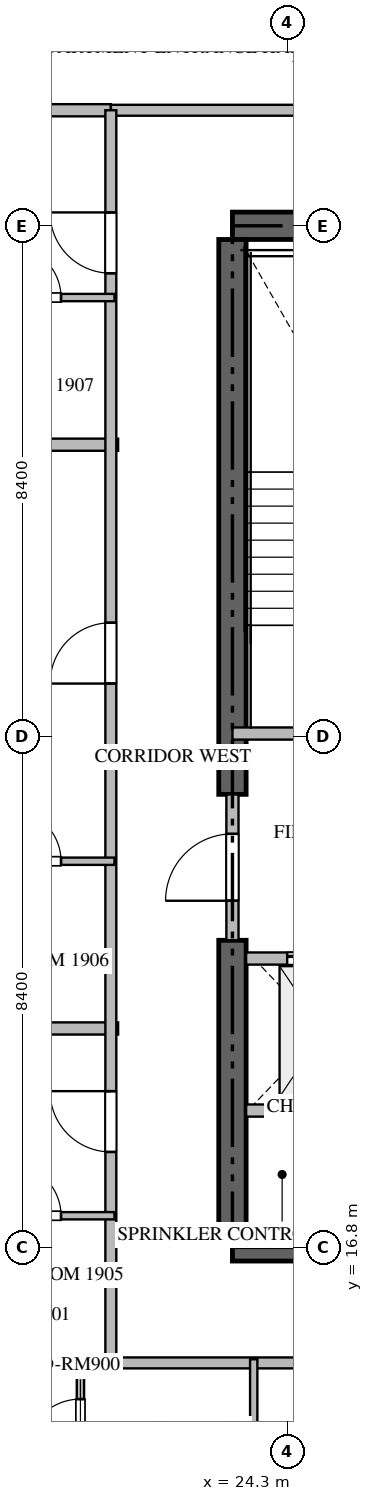
"""IFC4 building model, lengths in metres.
Left out: names, types, materials, properties, quantities, classifications, styles, units other than length and angle.
Written with IfcOpenShell. Run it as: python <this file> out.ifc"""

import sys

from ifc_helpers import new_model, si_unit, direction, frame, frame_2d, origin, place, context, subcontext, project, spatial, rectangle, extrude, source, transform, mapped, element, fill, save


model = new_model("IFC4")
c1 = context("Model", 3, precision=1e-05, world=origin(), true_north=direction((0.0, 1.0)))
c2 = subcontext(c1, "Body", "Model", "MODEL_VIEW")
j1 = project(units=[si_unit("LENGTHUNIT", "METRE"), si_unit("PLANEANGLEUNIT", "RADIAN")], contexts=[c1])
p1 = place(None, origin())
s1 = spatial("IfcSite", under=j1, at=p1, CompositionType="ELEMENT")
p2 = place(p1, origin())
s2 = spatial("IfcBuilding", under=s1, at=p2, CompositionType="ELEMENT")
p3 = place(p2, frame((0.0, 0.0, 79.2)))
s3 = spatial("IfcBuildingStorey", under=s2, at=p3, CompositionType="ELEMENT", Elevation=79.2)
for number, where, z_axis, x_axis in (
    (1, (23.4, 16.8, -0.26), (0.0, 0.0, 1.0), (1.0, 0.0, 0.0)),
    (2, (41.4, 33.6, -0.26), (0.0, 0.0, 1.0), (-1.0, 0.0, 0.0)),
):
    element("IfcWall", number, at=place(p3, frame(where, z_axis=z_axis, x_axis=x_axis)), inside=s3, PredefinedType="SHEAR", context=c2, shape_type="SweptSolid", body=[
        extrude(rectangle(XDim=18.0, YDim=0.45, at=frame_2d((9.0, 0.0))), origin(), (0.0, 0.0, 1.0), 3.748),
    ])
p4 = place(p3, frame((23.4, 17.025, -0.26), z_axis=(0.0, 0.0, 1.0), x_axis=(0.0, 1.0, 0.0)))
e3 = element("IfcWall", 3, at=p4, inside=s3, PredefinedType="SHEAR", context=c2, shape_type="SweptSolid", body=[
    extrude(rectangle(XDim=4.825, YDim=0.45, at=frame_2d((2.413, 0.0))), origin(), (0.0, 0.0, 1.0), 3.748),
])
p5 = place(p3, frame((23.4, 24.25, -0.26), z_axis=(0.0, 0.0, 1.0), x_axis=(0.0, 1.0, 0.0)))
e4 = element("IfcWall", 4, at=p5, inside=s3, PredefinedType="SHEAR", context=c2, shape_type="SweptSolid", body=[
    extrude(rectangle(XDim=9.125, YDim=0.45, at=frame_2d((4.562, 0.0))), origin(), (0.0, 0.0, 1.0), 3.748),
])
p6 = place(p3, frame((23.4, 25.25, 0.0), z_axis=(0.0, 0.0, 1.0), x_axis=(1.0, 0.0, 0.0)))
e5 = element("IfcWall", 5, at=p6, inside=s3, PredefinedType="STANDARD", context=c2, shape_type="SweptSolid", body=[
    extrude(rectangle(XDim=4.45, YDim=0.2, at=frame_2d((2.225, 0.0))), origin(), (0.0, 0.0, 1.0), 3.49),
])
p7 = place(p6, frame((1.65, 0.0, 0.0)))
e6 = element("IfcOpeningElement", 6, at=p7, cuts=e5, PredefinedType="OPENING", context=c2, shape_type="SweptSolid", body=[
    extrude(rectangle(XDim=1.1, YDim=2.15, at=frame_2d((0.55, 1.075))), frame((0.0, 0.11, 0.0), z_axis=(0.0, -1.0, 0.0), x_axis=(1.0, 0.0, 0.0)), (0.0, 0.0, 1.0), 0.22),
])
p8 = place(p3, frame((23.625, 21.55, 0.0), z_axis=(0.0, 0.0, 1.0), x_axis=(1.0, 0.0, 0.0)))
e7 = element("IfcWall", 7, at=p8, inside=s3, PredefinedType="STANDARD", context=c2, shape_type="SweptSolid", body=[
    extrude(rectangle(XDim=2.425, YDim=0.2, at=frame_2d((1.212, 0.0))), origin(), (0.0, 0.0, 1.0), 3.49),
])
p9 = place(p8, frame((0.675, 0.0, 0.0)))
e8 = element("IfcOpeningElement", 8, at=p9, cuts=e7, PredefinedType="OPENING", context=c2, shape_type="SweptSolid", body=[
    extrude(rectangle(XDim=1.2, YDim=2.2, at=frame_2d((0.6, 1.1))), frame((0.0, 0.11, 0.0), z_axis=(0.0, -1.0, 0.0), x_axis=(1.0, 0.0, 0.0)), (0.0, 0.0, 1.0), 0.22),
])
p10 = place(p3, frame((23.625, 19.05, 0.0), z_axis=(0.0, 0.0, 1.0), x_axis=(1.0, 0.0, 0.0)))
e9 = element("IfcWall", 9, at=p10, inside=s3, PredefinedType="STANDARD", context=c2, shape_type="SweptSolid", body=[
    extrude(rectangle(XDim=2.425, YDim=0.2, at=frame_2d((1.212, 0.0))), origin(), (0.0, 0.0, 1.0), 3.49),
])
p11 = place(p3, frame((23.4, 21.852, 0.0), z_axis=(0.0, 0.0, 1.0), x_axis=(0.0, 1.0, 0.0)))
e10 = element("IfcWall", 10, at=p11, inside=s3, PredefinedType="STANDARD", context=c2, shape_type="SweptSolid", body=[
    extrude(rectangle(XDim=2.396, YDim=0.2, at=frame_2d((1.198, 0.0))), origin(), (0.0, 0.0, 1.0), 3.49),
])
p12 = place(p11, frame((0.648, 0.0, 0.0)))
e11 = element("IfcOpeningElement", 11, at=p12, cuts=e10, PredefinedType="OPENING", context=c2, shape_type="SweptSolid", body=[
    extrude(rectangle(XDim=1.1, YDim=2.15, at=frame_2d((0.55, 1.075))), frame((0.0, 0.11, 0.0), z_axis=(0.0, -1.0, 0.0), x_axis=(1.0, 0.0, 0.0)), (0.0, 0.0, 1.0), 0.22),
])
for number, where, z_axis, x_axis in (
    (12, (6.082, 20.4, 0.0), (0.0, 0.0, 1.0), (1.0, 0.0, 0.0)),
    (13, (6.082, 30.0, 0.0), (0.0, 0.0, 1.0), (1.0, 0.0, 0.0)),
):
    element("IfcWall", number, at=place(p3, frame(where, z_axis=z_axis, x_axis=x_axis)), inside=s3, PredefinedType="PARTITIONING", context=c2, shape_type="SweptSolid", body=[
        extrude(rectangle(XDim=15.438, YDim=0.2, at=frame_2d((7.719, 0.0))), origin(), (0.0, 0.0, 1.0), 3.49),
    ])
for number, where, z_axis, x_axis in (
    (14, (6.082, 14.9, 0.0), (0.0, 0.0, 1.0), (1.0, 0.0, 0.0)),
    (15, (6.082, 35.5, 0.0), (0.0, 0.0, 1.0), (1.0, 0.0, 0.0)),
):
    element("IfcWall", number, at=place(p3, frame(where, z_axis=z_axis, x_axis=x_axis)), inside=s3, PredefinedType="PARTITIONING", context=c2, shape_type="SweptSolid", body=[
        extrude(rectangle(XDim=15.318, YDim=0.2, at=frame_2d((7.659, 0.0))), origin(), (0.0, 0.0, 1.0), 3.49),
    ])
p13 = place(p3, frame((21.402, 14.9, 0.0), z_axis=(0.0, 0.0, 1.0), x_axis=(1.0, 0.0, 0.0)))
e16 = element("IfcWall", 16, at=p13, inside=s3, PredefinedType="PARTITIONING", context=c2, shape_type="SweptSolid", body=[
    extrude(rectangle(XDim=21.996, YDim=0.18, at=frame_2d((10.998, 0.0))), origin(), (0.0, 0.0, 1.0), 3.49),
])
p14 = place(p13, frame((4.724, 0.0, 0.0)))
e17 = element("IfcOpeningElement", 17, at=p14, cuts=e16, PredefinedType="OPENING", context=c2, shape_type="SweptSolid", body=[
    extrude(rectangle(XDim=1.0, YDim=2.15, at=frame_2d((0.5, 1.075))), frame((0.0, 0.1, 0.0), z_axis=(0.0, -1.0, 0.0), x_axis=(1.0, 0.0, 0.0)), (0.0, 0.0, 1.0), 0.2),
])
p15 = place(p13, frame((10.498, 0.0, 0.0)))
e18 = element("IfcOpeningElement", 18, at=p15, cuts=e16, PredefinedType="OPENING", context=c2, shape_type="SweptSolid", body=[
    extrude(rectangle(XDim=1.0, YDim=2.15, at=frame_2d((0.5, 1.075))), frame((0.0, 0.1, 0.0), z_axis=(0.0, -1.0, 0.0), x_axis=(1.0, 0.0, 0.0)), (0.0, 0.0, 1.0), 0.2),
])
p16 = place(p3, frame((21.402, 35.5, 0.0), z_axis=(0.0, 0.0, 1.0), x_axis=(1.0, 0.0, 0.0)))
e19 = element("IfcWall", 19, at=p16, inside=s3, PredefinedType="PARTITIONING", context=c2, shape_type="SweptSolid", body=[
    extrude(rectangle(XDim=21.996, YDim=0.18, at=frame_2d((10.998, 0.0))), origin(), (0.0, 0.0, 1.0), 3.49),
])
p17 = place(p16, frame((10.498, 0.0, 0.0)))
e20 = element("IfcOpeningElement", 20, at=p17, cuts=e19, PredefinedType="OPENING", context=c2, shape_type="SweptSolid", body=[
    extrude(rectangle(XDim=1.0, YDim=2.15, at=frame_2d((0.5, 1.075))), frame((0.0, 0.1, 0.0), z_axis=(0.0, -1.0, 0.0), x_axis=(1.0, 0.0, 0.0)), (0.0, 0.0, 1.0), 0.2),
])
p18 = place(p16, frame((16.272, 0.0, 0.0)))
e21 = element("IfcOpeningElement", 21, at=p18, cuts=e19, PredefinedType="OPENING", context=c2, shape_type="SweptSolid", body=[
    extrude(rectangle(XDim=1.0, YDim=2.15, at=frame_2d((0.5, 1.075))), frame((0.0, 0.1, 0.0), z_axis=(0.0, -1.0, 0.0), x_axis=(1.0, 0.0, 0.0)), (0.0, 0.0, 1.0), 0.2),
])
p19 = place(p3, frame((21.4, 14.9, 0.0), z_axis=(0.0, 0.0, 1.0), x_axis=(0.0, 1.0, 0.0)))
e22 = element("IfcWall", 22, at=p19, inside=s3, PredefinedType="PARTITIONING", context=c2, shape_type="SweptSolid", body=[
    extrude(rectangle(XDim=20.6, YDim=0.18, at=frame_2d((10.3, 0.0))), origin(), (0.0, 0.0, 1.0), 3.49),
])
p20 = place(p19, frame((3.469, 0.0, 0.0)))
e23 = element("IfcOpeningElement", 23, at=p20, cuts=e22, PredefinedType="OPENING", context=c2, shape_type="SweptSolid", body=[
    extrude(rectangle(XDim=1.0, YDim=2.15, at=frame_2d((0.5, 1.075))), frame((0.0, 0.1, 0.0), z_axis=(0.0, -1.0, 0.0), x_axis=(1.0, 0.0, 0.0)), (0.0, 0.0, 1.0), 0.2),
])
p21 = place(p19, frame((11.172, 0.0, 0.0)))
e24 = element("IfcOpeningElement", 24, at=p21, cuts=e22, PredefinedType="OPENING", context=c2, shape_type="SweptSolid", body=[
    extrude(rectangle(XDim=1.0, YDim=2.15, at=frame_2d((0.5, 1.075))), frame((0.0, 0.1, 0.0), z_axis=(0.0, -1.0, 0.0), x_axis=(1.0, 0.0, 0.0)), (0.0, 0.0, 1.0), 0.2),
])
p22 = place(p19, frame((17.92, 0.0, 0.0)))
e25 = element("IfcOpeningElement", 25, at=p22, cuts=e22, PredefinedType="OPENING", context=c2, shape_type="SweptSolid", body=[
    extrude(rectangle(XDim=1.0, YDim=2.15, at=frame_2d((0.5, 1.075))), frame((0.0, 0.1, 0.0), z_axis=(0.0, -1.0, 0.0), x_axis=(1.0, 0.0, 0.0)), (0.0, 0.0, 1.0), 0.2),
])
p23 = place(p3, frame((23.75, 12.15, 0.0), z_axis=(0.0, 0.0, 1.0), x_axis=(0.0, 1.0, 0.0)))
e26 = element("IfcWall", 26, at=p23, inside=s3, PredefinedType="PARTITIONING", context=c2, shape_type="SweptSolid", body=[
    extrude(rectangle(XDim=2.81, YDim=0.12, at=frame_2d((1.405, 0.0))), origin(), (0.0, 0.0, 1.0), 3.49),
])
p24 = place(p3, frame((20.9, 12.75, 0.0), z_axis=(0.0, 0.0, 1.0), x_axis=(0.0, 1.0, 0.0)))
e27 = element("IfcWall", 27, at=p24, inside=s3, PredefinedType="PARTITIONING", context=c2, shape_type="SweptSolid", body=[
    extrude(rectangle(XDim=2.21, YDim=0.12, at=frame_2d((1.105, 0.0))), origin(), (0.0, 0.0, 1.0), 3.49),
])
p25 = place(p24, frame((0.655, 0.0, 0.0)))
e28 = element("IfcOpeningElement", 28, at=p25, cuts=e27, PredefinedType="OPENING", context=c2, shape_type="SweptSolid", body=[
    extrude(rectangle(XDim=0.9, YDim=2.1, at=frame_2d((0.45, 1.05))), frame((0.0, 0.07, 0.0), z_axis=(0.0, -1.0, 0.0), x_axis=(1.0, 0.0, 0.0)), (0.0, 0.0, 1.0), 0.14),
])
p26 = place(p3, frame((18.852, 17.32, 0.0), z_axis=(0.0, 0.0, 1.0), x_axis=(1.0, 0.0, 0.0)))
e29 = element("IfcWall", 29, at=p26, inside=s3, PredefinedType="PARTITIONING", context=c2, shape_type="SweptSolid", body=[
    extrude(rectangle(XDim=2.608, YDim=0.12, at=frame_2d((1.304, 0.0))), origin(), (0.0, 0.0, 1.0), 3.49),
])
p27 = place(p26, frame((0.879, 0.0, 0.0)))
e30 = element("IfcOpeningElement", 30, at=p27, cuts=e29, PredefinedType="OPENING", context=c2, shape_type="SweptSolid", body=[
    extrude(rectangle(XDim=0.85, YDim=2.1, at=frame_2d((0.425, 1.05))), frame((0.0, 0.07, 0.0), z_axis=(0.0, -1.0, 0.0), x_axis=(1.0, 0.0, 0.0)), (0.0, 0.0, 1.0), 0.14),
])
p28 = place(p3, frame((18.852, 23.15, 0.0), z_axis=(0.0, 0.0, 1.0), x_axis=(1.0, 0.0, 0.0)))
e31 = element("IfcWall", 31, at=p28, inside=s3, PredefinedType="PARTITIONING", context=c2, shape_type="SweptSolid", body=[
    extrude(rectangle(XDim=2.608, YDim=0.12, at=frame_2d((1.304, 0.0))), origin(), (0.0, 0.0, 1.0), 3.49),
])
p29 = place(p28, frame((0.879, 0.0, 0.0)))
e32 = element("IfcOpeningElement", 32, at=p29, cuts=e31, PredefinedType="OPENING", context=c2, shape_type="SweptSolid", body=[
    extrude(rectangle(XDim=0.85, YDim=2.1, at=frame_2d((0.425, 1.05))), frame((0.0, 0.07, 0.0), z_axis=(0.0, -1.0, 0.0), x_axis=(1.0, 0.0, 0.0)), (0.0, 0.0, 1.0), 0.14),
])
p30 = place(p3, frame((18.852, 32.42, 0.0), z_axis=(0.0, 0.0, 1.0), x_axis=(1.0, 0.0, 0.0)))
e33 = element("IfcWall", 33, at=p30, inside=s3, PredefinedType="PARTITIONING", context=c2, shape_type="SweptSolid", body=[
    extrude(rectangle(XDim=2.608, YDim=0.12, at=frame_2d((1.304, 0.0))), origin(), (0.0, 0.0, 1.0), 3.49),
])
p31 = place(p30, frame((0.879, 0.0, 0.0)))
e34 = element("IfcOpeningElement", 34, at=p31, cuts=e33, PredefinedType="OPENING", context=c2, shape_type="SweptSolid", body=[
    extrude(rectangle(XDim=0.85, YDim=2.1, at=frame_2d((0.425, 1.05))), frame((0.0, 0.07, 0.0), z_axis=(0.0, -1.0, 0.0), x_axis=(1.0, 0.0, 0.0)), (0.0, 0.0, 1.0), 0.14),
])
m1 = source(origin(), c2, "Body", "SweptSolid", [
    extrude(rectangle(XDim=1.2, YDim=2.2, at=frame_2d((0.6, 1.1))), frame((0.0, 0.025, 0.0), z_axis=(0.0, -1.0, 0.0), x_axis=(1.0, 0.0, 0.0)), (0.0, 0.0, 1.0), 0.05),
])
p32 = place(p9, origin())
e35 = element("IfcDoor", 35, at=p32, inside=s3, OperationType="DOUBLE_DOOR_SLIDING", PredefinedType="DOOR", context=c2, shape_type="MappedRepresentation", body=[
    mapped(m1, transform((0.0, 0.0, 0.0), scale=1.0)),
])
fill(e8, e35)
m2 = source(origin(), c2, "Body", "SweptSolid", [
    extrude(rectangle(XDim=1.1, YDim=2.15, at=frame_2d((0.55, 1.075))), frame((0.0, 0.025, 0.0), z_axis=(0.0, -1.0, 0.0), x_axis=(1.0, 0.0, 0.0)), (0.0, 0.0, 1.0), 0.05),
])
p33 = place(p12, origin())
e36 = element("IfcDoor", 36, at=p33, inside=s3, OperationType="SINGLE_SWING_LEFT", PredefinedType="DOOR", context=c2, shape_type="MappedRepresentation", body=[
    mapped(m2, transform((0.0, 0.0, 0.0), scale=1.0)),
])
fill(e11, e36)
m3 = source(origin(), c2, "Body", "SweptSolid", [
    extrude(rectangle(XDim=1.0, YDim=2.15, at=frame_2d((0.5, 1.075))), frame((0.0, 0.025, 0.0), z_axis=(0.0, -1.0, 0.0), x_axis=(1.0, 0.0, 0.0)), (0.0, 0.0, 1.0), 0.05),
])
p34 = place(p20, origin())
e37 = element("IfcDoor", 37, at=p34, inside=s3, OperationType="SINGLE_SWING_RIGHT", PredefinedType="DOOR", context=c2, shape_type="MappedRepresentation", body=[
    mapped(m3, transform((0.0, 0.0, 0.0), scale=1.0)),
])
fill(e23, e37)
p35 = place(p21, origin())
e38 = element("IfcDoor", 38, at=p35, inside=s3, OperationType="SINGLE_SWING_LEFT", PredefinedType="DOOR", context=c2, shape_type="MappedRepresentation", body=[
    mapped(m3, transform((0.0, 0.0, 0.0), scale=1.0)),
])
fill(e24, e38)
p36 = place(p22, origin())
e39 = element("IfcDoor", 39, at=p36, inside=s3, OperationType="SINGLE_SWING_RIGHT", PredefinedType="DOOR", context=c2, shape_type="MappedRepresentation", body=[
    mapped(m3, transform((0.0, 0.0, 0.0), scale=1.0)),
])
fill(e25, e39)
m4 = source(origin(), c2, "Body", "SweptSolid", [
    extrude(rectangle(XDim=0.9, YDim=2.1, at=frame_2d((0.45, 1.05))), frame((0.0, 0.025, 0.0), z_axis=(0.0, -1.0, 0.0), x_axis=(1.0, 0.0, 0.0)), (0.0, 0.0, 1.0), 0.05),
])
p37 = place(p25, origin())
e40 = element("IfcDoor", 40, at=p37, inside=s3, OperationType="SINGLE_SWING_LEFT", PredefinedType="DOOR", context=c2, shape_type="MappedRepresentation", body=[
    mapped(m4, transform((0.0, 0.0, 0.0), scale=1.0)),
])
fill(e28, e40)
m5 = source(origin(), c2, "Body", "SweptSolid", [
    extrude(rectangle(XDim=0.85, YDim=2.1, at=frame_2d((0.425, 1.05))), frame((0.0, 0.025, 0.0), z_axis=(0.0, -1.0, 0.0), x_axis=(1.0, 0.0, 0.0)), (0.0, 0.0, 1.0), 0.05),
])
p38 = place(p27, origin())
e41 = element("IfcDoor", 41, at=p38, inside=s3, OperationType="SINGLE_SWING_LEFT", PredefinedType="DOOR", context=c2, shape_type="MappedRepresentation", body=[
    mapped(m5, transform((0.0, 0.0, 0.0), scale=1.0)),
])
fill(e30, e41)
p39 = place(p29, origin())
e42 = element("IfcDoor", 42, at=p39, inside=s3, OperationType="SINGLE_SWING_LEFT", PredefinedType="DOOR", context=c2, shape_type="MappedRepresentation", body=[
    mapped(m5, transform((0.0, 0.0, 0.0), scale=1.0)),
])
fill(e32, e42)
p40 = place(p31, origin())
e43 = element("IfcDoor", 43, at=p40, inside=s3, OperationType="SINGLE_SWING_LEFT", PredefinedType="DOOR", context=c2, shape_type="MappedRepresentation", body=[
    mapped(m5, transform((0.0, 0.0, 0.0), scale=1.0)),
])
fill(e34, e43)
save(model, sys.argv[1])
